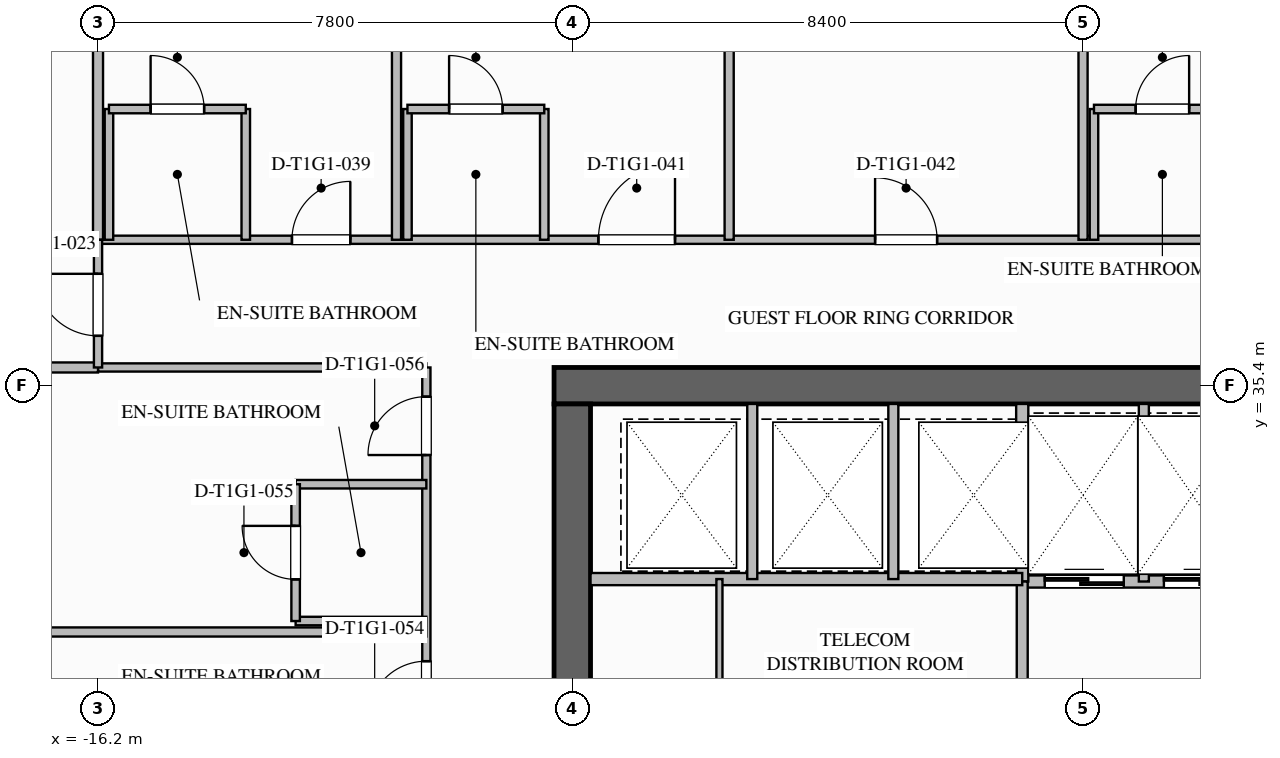
"""IFC4 building model, lengths in metres.
Left out: names, types, materials, properties, quantities, classifications, styles, units other than length and angle.
Written with IfcOpenShell. Run it as: python <this file> out.ifc"""

import sys

from ifc_helpers import new_model, si_unit, direction, frame, frame_2d, origin, place, context, subcontext, project, spatial, rectangle, extrude, element, fill, save


model = new_model("IFC4")
c1 = context("Model", 3, precision=1e-05, world=origin(), true_north=direction((0.0, 1.0)))
c2 = subcontext(c1, "Body", "Model", "MODEL_VIEW")
j1 = project(units=[si_unit("LENGTHUNIT", "METRE"), si_unit("PLANEANGLEUNIT", "RADIAN")], contexts=[c1])
p1 = place(None, origin())
s1 = spatial("IfcSite", under=j1, at=p1, CompositionType="ELEMENT")
p2 = place(p1, origin())
s2 = spatial("IfcBuilding", under=s1, at=p2, CompositionType="ELEMENT")
p3 = place(p2, frame((0.0, 0.0, 33.2)))
s3 = spatial("IfcBuildingStorey", under=s2, at=p3, CompositionType="ELEMENT", Elevation=33.2)
p4 = place(p3, frame((-8.7, 35.4, 0.0), z_axis=(0.0, 0.0, 1.0), x_axis=(1.0, 0.0, 0.0)))
e1 = element("IfcWall", 1, at=p4, inside=s3, PredefinedType="SHEAR", context=c2, shape_type="SweptSolid", body=[
    extrude(rectangle(XDim=17.4, YDim=0.6, at=frame_2d((8.7, 0.0))), origin(), (0.0, 0.0, 1.0), 3.5),
])
p5 = place(p3, frame((-8.4, 18.9, 0.0), z_axis=(0.0, 0.0, 1.0), x_axis=(0.0, 1.0, 0.0)))
e2 = element("IfcWall", 2, at=p5, inside=s3, PredefinedType="SHEAR", context=c2, shape_type="SweptSolid", body=[
    extrude(rectangle(XDim=16.2, YDim=0.6, at=frame_2d((8.1, 0.0))), origin(), (0.0, 0.0, 1.0), 3.5),
])
p6 = place(p5, frame((3.9, 0.0, 0.0)))
e3 = element("IfcOpeningElement", 3, at=p6, cuts=e2, PredefinedType="OPENING", context=c2, shape_type="SweptSolid", body=[
    extrude(rectangle(XDim=1.08, YDim=2.04, at=frame_2d((0.54, 1.02))), frame((0.0, 0.31, 0.0), z_axis=(0.0, -1.0, 0.0), x_axis=(1.0, 0.0, 0.0)), (0.0, 0.0, 1.0), 0.62),
])
p7 = place(p3, frame((-1.0, 32.18, 0.0), z_axis=(0.0, 0.0, 1.0), x_axis=(1.0, 0.0, 0.0)))
e4 = element("IfcWall", 4, at=p7, inside=s3, PredefinedType="SOLIDWALL", context=c2, shape_type="SweptSolid", body=[
    extrude(rectangle(XDim=4.1, YDim=0.2, at=frame_2d((2.05, 0.0))), origin(), (0.0, 0.0, 1.0), 3.24),
])
p8 = place(p7, frame((0.37, 0.0, 0.0)))
e5 = element("IfcOpeningElement", 5, at=p8, cuts=e4, PredefinedType="OPENING", context=c2, shape_type="SweptSolid", body=[
    extrude(rectangle(XDim=1.3, YDim=2.2, at=frame_2d((0.65, 1.1))), frame((0.0, 0.11, 0.0), z_axis=(0.0, -1.0, 0.0), x_axis=(1.0, 0.0, 0.0)), (0.0, 0.0, 1.0), 0.22),
])
p9 = place(p7, frame((2.33, 0.0, 0.0)))
e6 = element("IfcOpeningElement", 6, at=p9, cuts=e4, PredefinedType="OPENING", context=c2, shape_type="SweptSolid", body=[
    extrude(rectangle(XDim=1.3, YDim=2.2, at=frame_2d((0.65, 1.1))), frame((0.0, 0.11, 0.0), z_axis=(0.0, -1.0, 0.0), x_axis=(1.0, 0.0, 0.0)), (0.0, 0.0, 1.0), 0.22),
])
p10 = place(p3, frame((-1.0, 32.18, 0.0), z_axis=(0.0, 0.0, 1.0), x_axis=(0.0, 1.0, 0.0)))
e7 = element("IfcWall", 7, at=p10, inside=s3, PredefinedType="SOLIDWALL", context=c2, shape_type="SweptSolid", body=[
    extrude(rectangle(XDim=2.92, YDim=0.2, at=frame_2d((1.46, 0.0))), origin(), (0.0, 0.0, 1.0), 3.24),
])
p11 = place(p3, frame((1.0, 32.18, 0.0), z_axis=(0.0, 0.0, 1.0), x_axis=(0.0, 1.0, 0.0)))
e8 = element("IfcWall", 8, at=p11, inside=s3, PredefinedType="PARTITIONING", context=c2, shape_type="SweptSolid", body=[
    extrude(rectangle(XDim=2.92, YDim=0.165, at=frame_2d((1.46, 0.0))), origin(), (0.0, 0.0, 1.0), 3.24),
])
p12 = place(p3, frame((-1.0, 28.16, 0.0), z_axis=(0.0, 0.0, 1.0), x_axis=(0.0, 1.0, 0.0)))
e9 = element("IfcWall", 9, at=p12, inside=s3, PredefinedType="SOLIDWALL", context=c2, shape_type="SweptSolid", body=[
    extrude(rectangle(XDim=4.02, YDim=0.18, at=frame_2d((2.01, 0.0))), origin(), (0.0, 0.0, 1.0), 3.24),
])
p13 = place(p12, frame((1.4, 0.0, 0.0)))
e10 = element("IfcOpeningElement", 10, at=p13, cuts=e9, PredefinedType="OPENING", context=c2, shape_type="SweptSolid", body=[
    extrude(rectangle(XDim=1.0, YDim=2.1, at=frame_2d((0.5, 1.05))), frame((0.0, 0.1, 0.0), z_axis=(0.0, -1.0, 0.0), x_axis=(1.0, 0.0, 0.0)), (0.0, 0.0, 1.0), 0.2),
])
p14 = place(p3, frame((-8.1, 32.22, 0.0), z_axis=(0.0, 0.0, 1.0), x_axis=(1.0, 0.0, 0.0)))
e11 = element("IfcWall", 11, at=p14, inside=s3, PredefinedType="SOLIDWALL", context=c2, shape_type="SweptSolid", body=[
    extrude(rectangle(XDim=7.1, YDim=0.2, at=frame_2d((3.55, 0.0))), origin(), (0.0, 0.0, 1.0), 3.24),
])
for number, where, z_axis, x_axis in (
    (12, (-5.44, 32.22, 0.0), (0.0, 0.0, 1.0), (0.0, 1.0, 0.0)),
    (13, (-3.12, 32.22, 0.0), (0.0, 0.0, 1.0), (0.0, 1.0, 0.0)),
):
    element("IfcWall", number, at=place(p3, frame(where, z_axis=z_axis, x_axis=x_axis)), inside=s3, PredefinedType="PARTITIONING", context=c2, shape_type="SweptSolid", body=[
        extrude(rectangle(XDim=2.88, YDim=0.165, at=frame_2d((1.44, 0.0))), origin(), (0.0, 0.0, 1.0), 3.24),
    ])
p15 = place(p3, frame((-5.98, 28.16, 0.0), z_axis=(0.0, 0.0, 1.0), x_axis=(0.0, 1.0, 0.0)))
e14 = element("IfcWall", 14, at=p15, inside=s3, PredefinedType="PARTITIONING", context=c2, shape_type="SweptSolid", body=[
    extrude(rectangle(XDim=4.06, YDim=0.1, at=frame_2d((2.03, 0.0))), origin(), (0.0, 0.0, 1.0), 3.24),
])
p16 = place(p15, frame((1.2, 0.0, 0.0)))
e15 = element("IfcOpeningElement", 15, at=p16, cuts=e14, PredefinedType="OPENING", context=c2, shape_type="SweptSolid", body=[
    extrude(rectangle(XDim=0.92, YDim=2.1, at=frame_2d((0.46, 1.05))), frame((0.0, 0.06, 0.0), z_axis=(0.0, -1.0, 0.0), x_axis=(1.0, 0.0, 0.0)), (0.0, 0.0, 1.0), 0.12),
])
p17 = place(p3, frame((-16.2, 37.8, 0.0), z_axis=(0.0, 0.0, 1.0), x_axis=(1.0, 0.0, 0.0)))
e16 = element("IfcWall", 16, at=p17, inside=s3, PredefinedType="PARTITIONING", context=c2, shape_type="SweptSolid", body=[
    extrude(rectangle(XDim=32.4, YDim=0.135, at=frame_2d((16.2, 0.0))), origin(), (0.0, 0.0, 1.0), 3.24),
])
p18 = place(p17, frame((3.189, 0.0, 0.0)))
e17 = element("IfcOpeningElement", 17, at=p18, cuts=e16, PredefinedType="OPENING", context=c2, shape_type="SweptSolid", body=[
    extrude(rectangle(XDim=0.96, YDim=2.15, at=frame_2d((0.48, 1.075))), frame((0.0, 0.077, 0.0), z_axis=(0.0, -1.0, 0.0), x_axis=(1.0, 0.0, 0.0)), (0.0, 0.0, 1.0), 0.155),
])
p19 = place(p17, frame((8.229, 0.0, 0.0)))
e18 = element("IfcOpeningElement", 18, at=p19, cuts=e16, PredefinedType="OPENING", context=c2, shape_type="SweptSolid", body=[
    extrude(rectangle(XDim=1.26, YDim=2.2, at=frame_2d((0.63, 1.1))), frame((0.0, 0.077, 0.0), z_axis=(0.0, -1.0, 0.0), x_axis=(1.0, 0.0, 0.0)), (0.0, 0.0, 1.0), 0.155),
])
p20 = place(p17, frame((12.78, 0.0, 0.0)))
e19 = element("IfcOpeningElement", 19, at=p20, cuts=e16, PredefinedType="OPENING", context=c2, shape_type="SweptSolid", body=[
    extrude(rectangle(XDim=1.02, YDim=2.15, at=frame_2d((0.51, 1.075))), frame((0.0, 0.077, 0.0), z_axis=(0.0, -1.0, 0.0), x_axis=(1.0, 0.0, 0.0)), (0.0, 0.0, 1.0), 0.155),
])
p21 = place(p17, frame((19.425, 0.0, 0.0)))
e20 = element("IfcOpeningElement", 20, at=p21, cuts=e16, PredefinedType="OPENING", context=c2, shape_type="SweptSolid", body=[
    extrude(rectangle(XDim=0.96, YDim=2.15, at=frame_2d((0.48, 1.075))), frame((0.0, 0.077, 0.0), z_axis=(0.0, -1.0, 0.0), x_axis=(1.0, 0.0, 0.0)), (0.0, 0.0, 1.0), 0.155),
])
p22 = place(p17, frame((24.92, 0.0, 0.0)))
e21 = element("IfcOpeningElement", 21, at=p22, cuts=e16, PredefinedType="OPENING", context=c2, shape_type="SweptSolid", body=[
    extrude(rectangle(XDim=1.26, YDim=2.2, at=frame_2d((0.63, 1.1))), frame((0.0, 0.077, 0.0), z_axis=(0.0, -1.0, 0.0), x_axis=(1.0, 0.0, 0.0)), (0.0, 0.0, 1.0), 0.155),
])
p23 = place(p17, frame((30.68, 0.0, 0.0)))
e22 = element("IfcOpeningElement", 22, at=p23, cuts=e16, PredefinedType="OPENING", context=c2, shape_type="SweptSolid", body=[
    extrude(rectangle(XDim=0.96, YDim=2.15, at=frame_2d((0.48, 1.075))), frame((0.0, 0.077, 0.0), z_axis=(0.0, -1.0, 0.0), x_axis=(1.0, 0.0, 0.0)), (0.0, 0.0, 1.0), 0.155),
])
p24 = place(p3, frame((-16.2, 35.7, 0.0), z_axis=(0.0, 0.0, 1.0), x_axis=(1.0, 0.0, 0.0)))
e23 = element("IfcWall", 23, at=p24, inside=s3, PredefinedType="PARTITIONING", context=c2, shape_type="SweptSolid", body=[
    extrude(rectangle(XDim=5.4, YDim=0.135, at=frame_2d((2.7, 0.0))), origin(), (0.0, 0.0, 1.0), 3.24),
])
p25 = place(p3, frame((-10.8, 18.3, 0.0), z_axis=(0.0, 0.0, 1.0), x_axis=(0.0, 1.0, 0.0)))
e24 = element("IfcWall", 24, at=p25, inside=s3, PredefinedType="PARTITIONING", context=c2, shape_type="SweptSolid", body=[
    extrude(rectangle(XDim=17.4, YDim=0.135, at=frame_2d((8.7, 0.0))), origin(), (0.0, 0.0, 1.0), 3.24),
])
p26 = place(p25, frame((2.91, 0.0, 0.0)))
e25 = element("IfcOpeningElement", 25, at=p26, cuts=e24, PredefinedType="OPENING", context=c2, shape_type="SweptSolid", body=[
    extrude(rectangle(XDim=0.96, YDim=2.15, at=frame_2d((0.48, 1.075))), frame((0.0, 0.077, 0.0), z_axis=(0.0, -1.0, 0.0), x_axis=(1.0, 0.0, 0.0)), (0.0, 0.0, 1.0), 0.155),
])
p27 = place(p25, frame((7.26, 0.0, 0.0)))
e26 = element("IfcOpeningElement", 26, at=p27, cuts=e24, PredefinedType="OPENING", context=c2, shape_type="SweptSolid", body=[
    extrude(rectangle(XDim=0.96, YDim=2.15, at=frame_2d((0.48, 1.075))), frame((0.0, 0.077, 0.0), z_axis=(0.0, -1.0, 0.0), x_axis=(1.0, 0.0, 0.0)), (0.0, 0.0, 1.0), 0.155),
])
p28 = place(p25, frame((11.61, 0.0, 0.0)))
e27 = element("IfcOpeningElement", 27, at=p28, cuts=e24, PredefinedType="OPENING", context=c2, shape_type="SweptSolid", body=[
    extrude(rectangle(XDim=0.96, YDim=2.15, at=frame_2d((0.48, 1.075))), frame((0.0, 0.077, 0.0), z_axis=(0.0, -1.0, 0.0), x_axis=(1.0, 0.0, 0.0)), (0.0, 0.0, 1.0), 0.155),
])
p29 = place(p25, frame((15.96, 0.0, 0.0)))
e28 = element("IfcOpeningElement", 28, at=p29, cuts=e24, PredefinedType="OPENING", context=c2, shape_type="SweptSolid", body=[
    extrude(rectangle(XDim=0.96, YDim=2.15, at=frame_2d((0.48, 1.075))), frame((0.0, 0.077, 0.0), z_axis=(0.0, -1.0, 0.0), x_axis=(1.0, 0.0, 0.0)), (0.0, 0.0, 1.0), 0.155),
])
p30 = place(p3, frame((-16.2, 37.8, 0.0), z_axis=(0.0, 0.0, 1.0), x_axis=(0.0, 1.0, 0.0)))
e29 = element("IfcWall", 29, at=p30, inside=s3, PredefinedType="PARTITIONING", context=c2, shape_type="SweptSolid", body=[
    extrude(rectangle(XDim=16.08, YDim=0.165, at=frame_2d((8.04, 0.0))), origin(), (0.0, 0.0, 1.0), 2.298),
])
p31 = place(p3, frame((-26.88, 35.7, 0.0), z_axis=(0.0, 0.0, 1.0), x_axis=(1.0, 0.0, 0.0)))
e30 = element("IfcWall", 30, at=p31, inside=s3, PredefinedType="PARTITIONING", context=c2, shape_type="SweptSolid", body=[
    extrude(rectangle(XDim=10.68, YDim=0.165, at=frame_2d((5.34, 0.0))), origin(), (0.0, 0.0, 1.0), 2.298),
])
p32 = place(p3, frame((-16.2, 35.7, 0.0), z_axis=(0.0, 0.0, 1.0), x_axis=(0.0, 1.0, 0.0)))
e31 = element("IfcWall", 31, at=p32, inside=s3, PredefinedType="PARTITIONING", context=c2, shape_type="SweptSolid", body=[
    extrude(rectangle(XDim=2.1, YDim=0.135, at=frame_2d((1.05, 0.0))), origin(), (0.0, 0.0, 1.0), 2.298),
])
p33 = place(p32, frame((0.52, 0.0, 0.0)))
e32 = element("IfcOpeningElement", 32, at=p33, cuts=e31, PredefinedType="OPENING", context=c2, shape_type="SweptSolid", body=[
    extrude(rectangle(XDim=1.02, YDim=2.15, at=frame_2d((0.51, 1.075))), frame((0.0, 0.077, 0.0), z_axis=(0.0, -1.0, 0.0), x_axis=(1.0, 0.0, 0.0)), (0.0, 0.0, 1.0), 0.155),
])
p34 = place(p3, frame((-16.02, 37.8, 0.0), z_axis=(0.0, 0.0, 1.0), x_axis=(0.0, 1.0, 0.0)))
e33 = element("IfcWall", 33, at=p34, inside=s3, PredefinedType="PLUMBINGWALL", context=c2, shape_type="SweptSolid", body=[
    extrude(rectangle(XDim=2.15, YDim=0.14, at=frame_2d((1.075, 0.0))), origin(), (0.0, 0.0, 1.0), 2.298),
])
p35 = place(p3, frame((-13.77, 37.8, 0.0), z_axis=(0.0, 0.0, 1.0), x_axis=(0.0, 1.0, 0.0)))
e34 = element("IfcWall", 34, at=p35, inside=s3, PredefinedType="PLUMBINGWALL", context=c2, shape_type="SweptSolid", body=[
    extrude(rectangle(XDim=2.15, YDim=0.14, at=frame_2d((1.075, 0.0))), origin(), (0.0, 0.0, 1.0), 3.24),
])
p36 = place(p3, frame((-16.02, 39.95, 0.0), z_axis=(0.0, 0.0, 1.0), x_axis=(1.0, 0.0, 0.0)))
e35 = element("IfcWall", 35, at=p36, inside=s3, PredefinedType="PLUMBINGWALL", context=c2, shape_type="SweptSolid", body=[
    extrude(rectangle(XDim=2.25, YDim=0.14, at=frame_2d((1.125, 0.0))), origin(), (0.0, 0.0, 1.0), 3.24),
])
p37 = place(p36, frame((0.685, 0.0, 0.0)))
e36 = element("IfcOpeningElement", 36, at=p37, cuts=e35, PredefinedType="OPENING", context=c2, shape_type="SweptSolid", body=[
    extrude(rectangle(XDim=0.88, YDim=2.1, at=frame_2d((0.44, 1.05))), frame((0.0, 0.08, 0.0), z_axis=(0.0, -1.0, 0.0), x_axis=(1.0, 0.0, 0.0)), (0.0, 0.0, 1.0), 0.16),
])
p38 = place(p3, frame((-11.291, 37.8, 0.0), z_axis=(0.0, 0.0, 1.0), x_axis=(0.0, 1.0, 0.0)))
e37 = element("IfcWall", 37, at=p38, inside=s3, PredefinedType="PARTITIONING", context=c2, shape_type="SweptSolid", body=[
    extrude(rectangle(XDim=16.08, YDim=0.15, at=frame_2d((8.04, 0.0))), origin(), (0.0, 0.0, 1.0), 3.24),
])
for number, where, z_axis, x_axis in (
    (38, (-11.111, 37.8, 0.0), (0.0, 0.0, 1.0), (0.0, 1.0, 0.0)),
    (39, (-8.861, 37.8, 0.0), (0.0, 0.0, 1.0), (0.0, 1.0, 0.0)),
):
    element("IfcWall", number, at=place(p3, frame(where, z_axis=z_axis, x_axis=x_axis)), inside=s3, PredefinedType="PLUMBINGWALL", context=c2, shape_type="SweptSolid", body=[
        extrude(rectangle(XDim=2.15, YDim=0.14, at=frame_2d((1.075, 0.0))), origin(), (0.0, 0.0, 1.0), 3.24),
    ])
p39 = place(p3, frame((-11.111, 39.95, 0.0), z_axis=(0.0, 0.0, 1.0), x_axis=(1.0, 0.0, 0.0)))
e40 = element("IfcWall", 40, at=p39, inside=s3, PredefinedType="PLUMBINGWALL", context=c2, shape_type="SweptSolid", body=[
    extrude(rectangle(XDim=2.25, YDim=0.14, at=frame_2d((1.125, 0.0))), origin(), (0.0, 0.0, 1.0), 3.24),
])
p40 = place(p39, frame((0.685, 0.0, 0.0)))
e41 = element("IfcOpeningElement", 41, at=p40, cuts=e40, PredefinedType="OPENING", context=c2, shape_type="SweptSolid", body=[
    extrude(rectangle(XDim=0.88, YDim=2.1, at=frame_2d((0.44, 1.05))), frame((0.0, 0.08, 0.0), z_axis=(0.0, -1.0, 0.0), x_axis=(1.0, 0.0, 0.0)), (0.0, 0.0, 1.0), 0.16),
])
p41 = place(p3, frame((-5.82, 37.8, 0.0), z_axis=(0.0, 0.0, 1.0), x_axis=(0.0, 1.0, 0.0)))
e42 = element("IfcWall", 42, at=p41, inside=s3, PredefinedType="PARTITIONING", context=c2, shape_type="SweptSolid", body=[
    extrude(rectangle(XDim=16.08, YDim=0.15, at=frame_2d((8.04, 0.0))), origin(), (0.0, 0.0, 1.0), 3.24),
])
p42 = place(p3, frame((0.0, 37.8, 0.0), z_axis=(0.0, 0.0, 1.0), x_axis=(0.0, 1.0, 0.0)))
e43 = element("IfcWall", 43, at=p42, inside=s3, PredefinedType="PARTITIONING", context=c2, shape_type="SweptSolid", body=[
    extrude(rectangle(XDim=15.4, YDim=0.15, at=frame_2d((7.7, 0.0))), origin(), (0.0, 0.0, 1.0), 2.298),
])
p43 = place(p3, frame((0.18, 37.8, 0.0), z_axis=(0.0, 0.0, 1.0), x_axis=(0.0, 1.0, 0.0)))
e44 = element("IfcWall", 44, at=p43, inside=s3, PredefinedType="PLUMBINGWALL", context=c2, shape_type="SweptSolid", body=[
    extrude(rectangle(XDim=2.15, YDim=0.14, at=frame_2d((1.075, 0.0))), origin(), (0.0, 0.0, 1.0), 2.617),
])
p44 = place(p3, frame((0.18, 39.95, 0.0), z_axis=(0.0, 0.0, 1.0), x_axis=(1.0, 0.0, 0.0)))
e45 = element("IfcWall", 45, at=p44, inside=s3, PredefinedType="PLUMBINGWALL", context=c2, shape_type="SweptSolid", body=[
    extrude(rectangle(XDim=2.25, YDim=0.14, at=frame_2d((1.125, 0.0))), origin(), (0.0, 0.0, 1.0), 3.24),
])
p45 = place(p44, frame((0.685, 0.0, 0.0)))
e46 = element("IfcOpeningElement", 46, at=p45, cuts=e45, PredefinedType="OPENING", context=c2, shape_type="SweptSolid", body=[
    extrude(rectangle(XDim=0.88, YDim=2.1, at=frame_2d((0.44, 1.05))), frame((0.0, 0.08, 0.0), z_axis=(0.0, -1.0, 0.0), x_axis=(1.0, 0.0, 0.0)), (0.0, 0.0, 1.0), 0.16),
])
p46 = place(p3, frame((-26.2, 31.35, 0.0), z_axis=(0.0, 0.0, 1.0), x_axis=(1.0, 0.0, 0.0)))
e47 = element("IfcWall", 47, at=p46, inside=s3, PredefinedType="PARTITIONING", context=c2, shape_type="SweptSolid", body=[
    extrude(rectangle(XDim=15.4, YDim=0.15, at=frame_2d((7.7, 0.0))), origin(), (0.0, 0.0, 1.0), 3.24),
])
for number, where, z_axis, x_axis in (
    (48, (-10.8, 31.53, 0.0), (0.0, 0.0, 1.0), (-1.0, 0.0, 0.0)),
    (49, (-10.8, 33.78, 0.0), (0.0, 0.0, 1.0), (-1.0, 0.0, 0.0)),
):
    element("IfcWall", number, at=place(p3, frame(where, z_axis=z_axis, x_axis=x_axis)), inside=s3, PredefinedType="PLUMBINGWALL", context=c2, shape_type="SweptSolid", body=[
        extrude(rectangle(XDim=2.15, YDim=0.14, at=frame_2d((1.075, 0.0))), origin(), (0.0, 0.0, 1.0), 3.24),
    ])
p47 = place(p3, frame((-12.95, 31.53, 0.0), z_axis=(0.0, 0.0, 1.0), x_axis=(0.0, 1.0, 0.0)))
e50 = element("IfcWall", 50, at=p47, inside=s3, PredefinedType="PLUMBINGWALL", context=c2, shape_type="SweptSolid", body=[
    extrude(rectangle(XDim=2.25, YDim=0.14, at=frame_2d((1.125, 0.0))), origin(), (0.0, 0.0, 1.0), 3.24),
])
p48 = place(p47, frame((0.685, 0.0, 0.0)))
e51 = element("IfcOpeningElement", 51, at=p48, cuts=e50, PredefinedType="OPENING", context=c2, shape_type="SweptSolid", body=[
    extrude(rectangle(XDim=0.88, YDim=2.1, at=frame_2d((0.44, 1.05))), frame((0.0, 0.08, 0.0), z_axis=(0.0, -1.0, 0.0), x_axis=(1.0, 0.0, 0.0)), (0.0, 0.0, 1.0), 0.16),
])
p49 = place(p8, origin())
e52 = element("IfcDoor", 52, at=p49, inside=s3, OperationType="SLIDING_TO_LEFT", PredefinedType="DOOR", context=c2, shape_type="SweptSolid", body=[
    extrude(rectangle(XDim=1.3, YDim=2.2, at=frame_2d((0.65, 1.1))), frame((0.0, 0.025, 0.0), z_axis=(0.0, -1.0, 0.0), x_axis=(1.0, 0.0, 0.0)), (0.0, 0.0, 1.0), 0.05),
])
fill(e5, e52)
p50 = place(p9, origin())
e53 = element("IfcDoor", 53, at=p50, inside=s3, OperationType="SLIDING_TO_LEFT", PredefinedType="DOOR", context=c2, shape_type="SweptSolid", body=[
    extrude(rectangle(XDim=1.3, YDim=2.2, at=frame_2d((0.65, 1.1))), frame((0.0, 0.025, 0.0), z_axis=(0.0, -1.0, 0.0), x_axis=(1.0, 0.0, 0.0)), (0.0, 0.0, 1.0), 0.05),
])
fill(e6, e53)
p51 = place(p33, origin())
e54 = element("IfcDoor", 54, at=p51, inside=s3, OperationType="SINGLE_SWING_RIGHT", PredefinedType="DOOR", context=c2, shape_type="SweptSolid", body=[
    extrude(rectangle(XDim=1.02, YDim=2.15, at=frame_2d((0.51, 1.075))), frame((0.0, 0.025, 0.0), z_axis=(0.0, -1.0, 0.0), x_axis=(1.0, 0.0, 0.0)), (0.0, 0.0, 1.0), 0.05),
])
fill(e32, e54)
p52 = place(p37, origin())
e55 = element("IfcDoor", 55, at=p52, inside=s3, OperationType="SINGLE_SWING_LEFT", PredefinedType="DOOR", context=c2, shape_type="SweptSolid", body=[
    extrude(rectangle(XDim=0.88, YDim=2.1, at=frame_2d((0.44, 1.05))), frame((0.0, 0.025, 0.0), z_axis=(0.0, -1.0, 0.0), x_axis=(1.0, 0.0, 0.0)), (0.0, 0.0, 1.0), 0.05),
])
fill(e36, e55)
p53 = place(p18, origin())
e56 = element("IfcDoor", 56, at=p53, inside=s3, OperationType="SINGLE_SWING_RIGHT", PredefinedType="DOOR", context=c2, shape_type="SweptSolid", body=[
    extrude(rectangle(XDim=0.96, YDim=2.15, at=frame_2d((0.48, 1.075))), frame((0.0, 0.025, 0.0), z_axis=(0.0, -1.0, 0.0), x_axis=(1.0, 0.0, 0.0)), (0.0, 0.0, 1.0), 0.05),
])
fill(e17, e56)
p54 = place(p40, origin())
e57 = element("IfcDoor", 57, at=p54, inside=s3, OperationType="SINGLE_SWING_LEFT", PredefinedType="DOOR", context=c2, shape_type="SweptSolid", body=[
    extrude(rectangle(XDim=0.88, YDim=2.1, at=frame_2d((0.44, 1.05))), frame((0.0, 0.025, 0.0), z_axis=(0.0, -1.0, 0.0), x_axis=(1.0, 0.0, 0.0)), (0.0, 0.0, 1.0), 0.05),
])
fill(e41, e57)
p55 = place(p19, origin())
e58 = element("IfcDoor", 58, at=p55, inside=s3, OperationType="SINGLE_SWING_RIGHT", PredefinedType="DOOR", context=c2, shape_type="SweptSolid", body=[
    extrude(rectangle(XDim=1.26, YDim=2.2, at=frame_2d((0.63, 1.1))), frame((0.0, 0.025, 0.0), z_axis=(0.0, -1.0, 0.0), x_axis=(1.0, 0.0, 0.0)), (0.0, 0.0, 1.0), 0.05),
])
fill(e18, e58)
p56 = place(p20, origin())
e59 = element("IfcDoor", 59, at=p56, inside=s3, OperationType="SINGLE_SWING_LEFT", PredefinedType="DOOR", context=c2, shape_type="SweptSolid", body=[
    extrude(rectangle(XDim=1.02, YDim=2.15, at=frame_2d((0.51, 1.075))), frame((0.0, 0.025, 0.0), z_axis=(0.0, -1.0, 0.0), x_axis=(1.0, 0.0, 0.0)), (0.0, 0.0, 1.0), 0.05),
])
fill(e19, e59)
p57 = place(p45, origin())
e60 = element("IfcDoor", 60, at=p57, inside=s3, OperationType="SINGLE_SWING_RIGHT", PredefinedType="DOOR", context=c2, shape_type="SweptSolid", body=[
    extrude(rectangle(XDim=0.88, YDim=2.1, at=frame_2d((0.44, 1.05))), frame((0.0, 0.025, 0.0), z_axis=(0.0, -1.0, 0.0), x_axis=(1.0, 0.0, 0.0)), (0.0, 0.0, 1.0), 0.05),
])
fill(e46, e60)
p58 = place(p28, origin())
e61 = element("IfcDoor", 61, at=p58, inside=s3, OperationType="SINGLE_SWING_LEFT", PredefinedType="DOOR", context=c2, shape_type="SweptSolid", body=[
    extrude(rectangle(XDim=0.96, YDim=2.15, at=frame_2d((0.48, 1.075))), frame((0.0, 0.025, 0.0), z_axis=(0.0, -1.0, 0.0), x_axis=(1.0, 0.0, 0.0)), (0.0, 0.0, 1.0), 0.05),
])
fill(e27, e61)
p59 = place(p48, origin())
e62 = element("IfcDoor", 62, at=p59, inside=s3, OperationType="SINGLE_SWING_RIGHT", PredefinedType="DOOR", context=c2, shape_type="SweptSolid", body=[
    extrude(rectangle(XDim=0.88, YDim=2.1, at=frame_2d((0.44, 1.05))), frame((0.0, 0.025, 0.0), z_axis=(0.0, -1.0, 0.0), x_axis=(1.0, 0.0, 0.0)), (0.0, 0.0, 1.0), 0.05),
])
fill(e51, e62)
p60 = place(p29, origin())
e63 = element("IfcDoor", 63, at=p60, inside=s3, OperationType="SINGLE_SWING_LEFT", PredefinedType="DOOR", context=c2, shape_type="SweptSolid", body=[
    extrude(rectangle(XDim=0.96, YDim=2.15, at=frame_2d((0.48, 1.075))), frame((0.0, 0.025, 0.0), z_axis=(0.0, -1.0, 0.0), x_axis=(1.0, 0.0, 0.0)), (0.0, 0.0, 1.0), 0.05),
])
fill(e28, e63)
save(model, sys.argv[1])
